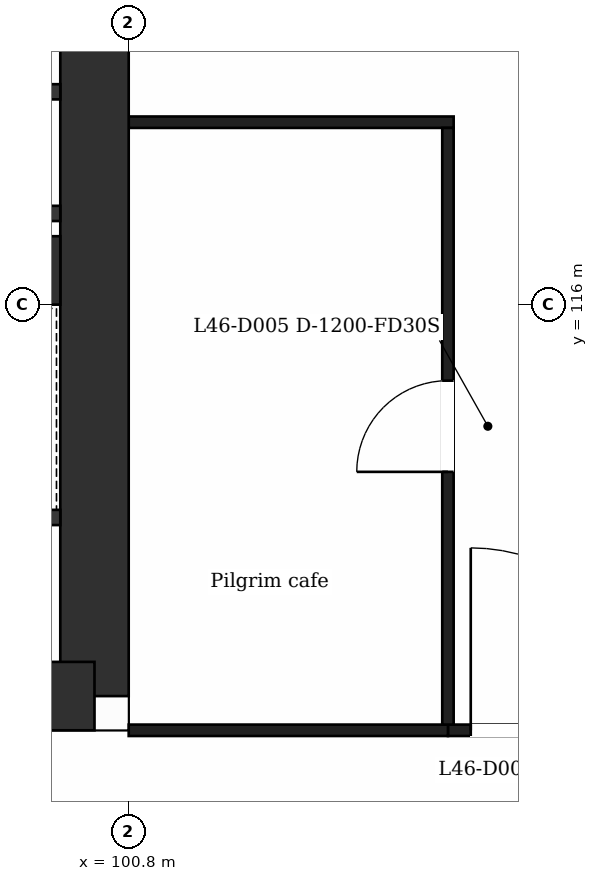
"""IFC4 building model, lengths in metres.
Left out: names, types, materials, properties, quantities, classifications, styles, units other than length and angle.
Written with IfcOpenShell. Run it as: python <this file> out.ifc"""

import sys

from ifc_helpers import new_model, si_unit, direction, frame, frame_2d, origin, place, context, subcontext, project, spatial, rectangle, extrude, element, fill, save


model = new_model("IFC4")
c1 = context("Model", 3, precision=1e-05, world=origin(), true_north=direction((0.0, 1.0)))
c2 = subcontext(c1, "Body", "Model", "MODEL_VIEW")
j1 = project(units=[si_unit("LENGTHUNIT", "METRE"), si_unit("PLANEANGLEUNIT", "RADIAN")], contexts=[c1])
p1 = place(None, origin())
s1 = spatial("IfcSite", under=j1, at=p1, CompositionType="ELEMENT")
p2 = place(p1, origin())
s2 = spatial("IfcBuilding", under=s1, at=p2, CompositionType="ELEMENT")
p3 = place(p2, frame((0.0, 0.0, 192.2)))
s3 = spatial("IfcBuildingStorey", under=s2, at=p3, CompositionType="ELEMENT", Elevation=192.2)
p4 = place(p3, frame((100.35, 131.95, 0.0), z_axis=(0.0, 0.0, 1.0), x_axis=(0.0, -1.0, 0.0)))
e1 = element("IfcWall", 1, at=p4, inside=s3, PredefinedType="SHEAR", context=c2, shape_type="SweptSolid", body=[
    extrude(rectangle(XDim=21.1, YDim=0.9, at=frame_2d((10.55, 0.0))), origin(), (0.0, 0.0, 1.0), 5.0),
])
p5 = place(p4, frame((7.8, 0.0, 0.0)))
e2 = element("IfcOpeningElement", 2, at=p5, cuts=e1, PredefinedType="OPENING", context=c2, shape_type="SweptSolid", body=[
    extrude(rectangle(XDim=1.4, YDim=2.1, at=frame_2d((0.7, 1.05))), frame((0.0, 0.46, 0.0), z_axis=(0.0, -1.0, 0.0), x_axis=(1.0, 0.0, 0.0)), (0.0, 0.0, 1.0), 0.92),
])
p6 = place(p3, frame((100.35, 110.85, 0.0), z_axis=(0.0, 0.0, 1.0), x_axis=(-1.0, 0.0, 0.0)))
e3 = element("IfcWall", 3, at=p6, inside=s3, PredefinedType="SHEAR", context=c2, shape_type="SweptSolid", body=[
    extrude(rectangle(XDim=14.166, YDim=0.9, at=frame_2d((7.083, 0.0))), origin(), (0.0, 0.0, 1.0), 5.0),
])
p7 = place(p6, frame((5.855, 0.0, 0.0)))
e4 = element("IfcOpeningElement", 4, at=p7, cuts=e3, PredefinedType="OPENING", context=c2, shape_type="SweptSolid", body=[
    extrude(rectangle(XDim=1.4, YDim=2.1, at=frame_2d((0.7, 1.05))), frame((0.0, 0.46, 0.0), z_axis=(0.0, -1.0, 0.0), x_axis=(1.0, 0.0, 0.0)), (0.0, 0.0, 1.0), 0.92),
])
p8 = place(p3, frame((94.8, 116.45, 0.0), z_axis=(0.0, 0.0, 1.0), x_axis=(1.0, 0.0, 0.0)))
e5 = element("IfcWall", 5, at=p8, inside=s3, PredefinedType="SHEAR", context=c2, shape_type="SweptSolid", body=[
    extrude(rectangle(XDim=5.1, YDim=0.9, at=frame_2d((2.55, 0.0))), origin(), (0.0, 0.0, 1.0), 5.0),
])
p9 = place(p3, frame((105.0, 110.4, 0.0), z_axis=(0.0, 0.0, 1.0), x_axis=(1.0, 0.0, 0.0)))
e6 = element("IfcWall", 6, at=p9, inside=s3, PredefinedType="PARTITIONING", context=c2, shape_type="SweptSolid", body=[
    extrude(rectangle(XDim=3.0, YDim=0.15, at=frame_2d((1.5, 0.0))), origin(), (0.0, 0.0, 1.0), 4.5),
])
p10 = place(p9, frame((0.3, 0.0, 0.0)))
e7 = element("IfcOpeningElement", 7, at=p10, cuts=e6, PredefinedType="OPENING", context=c2, shape_type="SweptSolid", body=[
    extrude(rectangle(XDim=2.4, YDim=2.1, at=frame_2d((1.2, 1.05))), frame((0.0, 0.085, 0.0), z_axis=(0.0, -1.0, 0.0), x_axis=(1.0, 0.0, 0.0)), (0.0, 0.0, 1.0), 0.17),
])
p11 = place(p3, frame((100.8, 110.4, 0.0), z_axis=(0.0, 0.0, 1.0), x_axis=(1.0, 0.0, 0.0)))
e8 = element("IfcWall", 8, at=p11, inside=s3, PredefinedType="PARTITIONING", context=c2, shape_type="SweptSolid", body=[
    extrude(rectangle(XDim=4.2, YDim=0.15, at=frame_2d((2.1, 0.0))), origin(), (0.0, 0.0, 1.0), 4.5),
])
p12 = place(p3, frame((95.127, 113.2, 0.0), z_axis=(0.0, 0.0, 1.0), x_axis=(1.0, 0.0, 0.0)))
e9 = element("IfcWall", 9, at=p12, inside=s3, PredefinedType="PARTITIONING", context=c2, shape_type="SweptSolid", body=[
    extrude(rectangle(XDim=4.773, YDim=0.2, at=frame_2d((2.386, 0.0))), origin(), (0.0, 0.0, 1.0), 4.5),
])
p13 = place(p12, frame((3.001, 0.0, 0.0)))
e10 = element("IfcOpeningElement", 10, at=p13, cuts=e9, PredefinedType="OPENING", context=c2, shape_type="SweptSolid", body=[
    extrude(rectangle(XDim=1.1, YDim=2.1, at=frame_2d((0.55, 1.05))), frame((0.0, 0.11, 0.0), z_axis=(0.0, -1.0, 0.0), x_axis=(1.0, 0.0, 0.0)), (0.0, 0.0, 1.0), 0.22),
])
p14 = place(p3, frame((95.227, 117.2, 0.0), z_axis=(0.0, 0.0, 1.0), x_axis=(1.0, 0.0, 0.0)))
e11 = element("IfcWall", 11, at=p14, inside=s3, PredefinedType="PARTITIONING", context=c2, shape_type="SweptSolid", body=[
    extrude(rectangle(XDim=4.673, YDim=0.2, at=frame_2d((2.336, 0.0))), origin(), (0.0, 0.0, 1.0), 4.5),
])
p15 = place(p3, frame((100.8, 118.4, 0.0), z_axis=(0.0, 0.0, 1.0), x_axis=(1.0, 0.0, 0.0)))
e12 = element("IfcWall", 12, at=p15, inside=s3, PredefinedType="PARTITIONING", context=c2, shape_type="SweptSolid", body=[
    extrude(rectangle(XDim=4.275, YDim=0.15, at=frame_2d((2.137, 0.0))), origin(), (0.0, 0.0, 1.0), 4.5),
])
p16 = place(p3, frame((95.227, 118.8, 0.0), z_axis=(0.0, 0.0, 1.0), x_axis=(1.0, 0.0, 0.0)))
e13 = element("IfcWall", 13, at=p16, inside=s3, PredefinedType="PARTITIONING", context=c2, shape_type="SweptSolid", body=[
    extrude(rectangle(XDim=4.673, YDim=0.2, at=frame_2d((2.336, 0.0))), origin(), (0.0, 0.0, 1.0), 4.5),
])
p17 = place(p3, frame((105.0, 110.475, 0.0), z_axis=(0.0, 0.0, 1.0), x_axis=(0.0, 1.0, 0.0)))
e14 = element("IfcWall", 14, at=p17, inside=s3, PredefinedType="PARTITIONING", context=c2, shape_type="SweptSolid", body=[
    extrude(rectangle(XDim=7.85, YDim=0.15, at=frame_2d((3.925, 0.0))), origin(), (0.0, 0.0, 1.0), 4.5),
])
p18 = place(p17, frame((3.325, 0.0, 0.0)))
e15 = element("IfcOpeningElement", 15, at=p18, cuts=e14, PredefinedType="OPENING", context=c2, shape_type="SweptSolid", body=[
    extrude(rectangle(XDim=1.2, YDim=2.1, at=frame_2d((0.6, 1.05))), frame((0.0, 0.085, 0.0), z_axis=(0.0, -1.0, 0.0), x_axis=(1.0, 0.0, 0.0)), (0.0, 0.0, 1.0), 0.17),
])
p19 = place(p10, origin())
e16 = element("IfcDoor", 16, at=p19, inside=s3, OperationType="SINGLE_SWING_LEFT", PredefinedType="DOOR", context=c2, shape_type="SweptSolid", body=[
    extrude(rectangle(XDim=2.4, YDim=2.1, at=frame_2d((1.2, 1.05))), frame((0.0, 0.025, 0.0), z_axis=(0.0, -1.0, 0.0), x_axis=(1.0, 0.0, 0.0)), (0.0, 0.0, 1.0), 0.05),
])
fill(e7, e16)
p20 = place(p18, origin())
e17 = element("IfcDoor", 17, at=p20, inside=s3, OperationType="SINGLE_SWING_LEFT", PredefinedType="DOOR", context=c2, shape_type="SweptSolid", body=[
    extrude(rectangle(XDim=1.2, YDim=2.1, at=frame_2d((0.6, 1.05))), frame((0.0, 0.025, 0.0), z_axis=(0.0, -1.0, 0.0), x_axis=(1.0, 0.0, 0.0)), (0.0, 0.0, 1.0), 0.05),
])
fill(e15, e17)
save(model, sys.argv[1])
